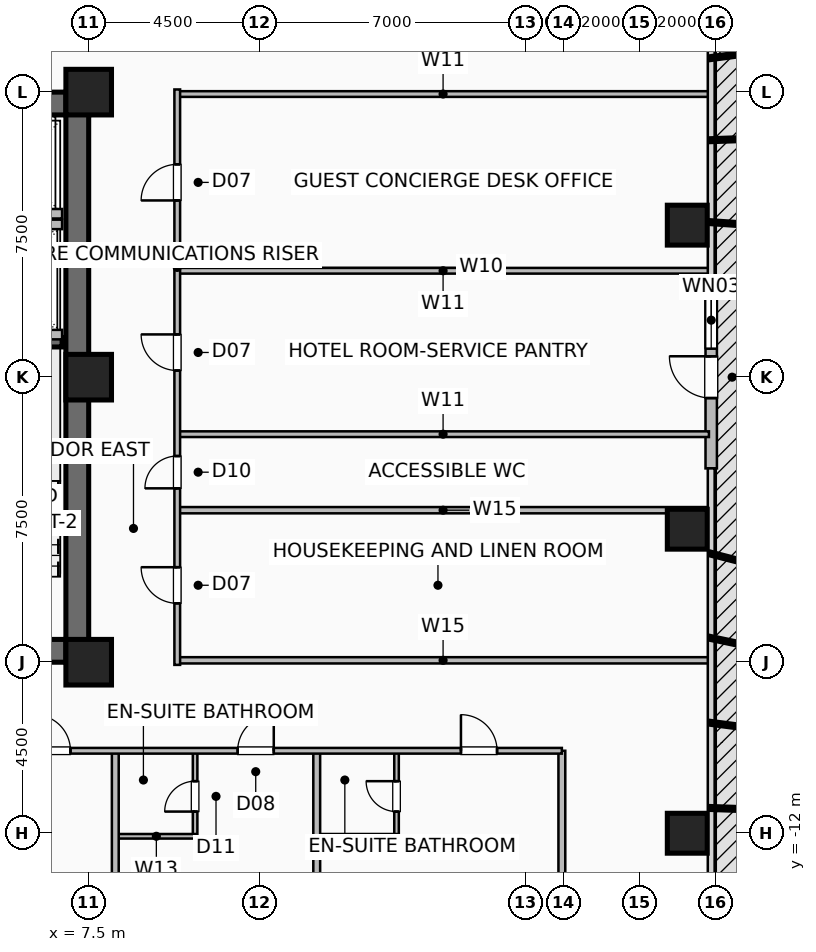
"""IFC4 building model, lengths in metres.
Left out: names, types, materials, properties, quantities, classifications, styles, units other than length and angle.
Written with IfcOpenShell. Run it as: python <this file> out.ifc"""

import sys

from ifc_helpers import new_model, si_unit, direction, frame, frame_2d, origin, origin_2d, place, context, subcontext, project, spatial, rectangle, hollow_rectangle, extrude, element, fill, save


model = new_model("IFC4")
c1 = context("Model", 3, precision=1e-05, world=origin(), true_north=direction((0.0, 1.0)))
c2 = subcontext(c1, "Body", "Model", "MODEL_VIEW")
j1 = project(units=[si_unit("LENGTHUNIT", "METRE"), si_unit("PLANEANGLEUNIT", "RADIAN")], contexts=[c1])
p1 = place(None, origin())
s1 = spatial("IfcSite", under=j1, at=p1, CompositionType="ELEMENT")
p2 = place(p1, origin())
s2 = spatial("IfcBuilding", under=s1, at=p2, CompositionType="ELEMENT")
p3 = place(p2, frame((0.0, 0.0, 27.0)))
s3 = spatial("IfcBuildingStorey", under=s2, at=p3, CompositionType="ELEMENT", Elevation=27.0)
for number, where, z_axis, x_axis in (
    (1, (7.5, -7.5, 0.0), (0.0, 0.0, 1.0), (1.0, 0.0, 0.0)),
    (2, (7.5, 0.0, 0.0), (0.0, 0.0, 1.0), (1.0, 0.0, 0.0)),
    (3, (7.5, 7.5, 0.0), (0.0, 0.0, 1.0), (1.0, 0.0, 0.0)),
):
    element("IfcColumn", number, at=place(p3, frame(where, z_axis=z_axis, x_axis=x_axis)), inside=s3, PredefinedType="COLUMN", context=c2, shape_type="SweptSolid", body=[
        extrude(hollow_rectangle(XDim=1.2, YDim=1.2, WallThickness=0.055, at=origin_2d()), origin(), (0.0, 0.0, 1.0), 3.5),
    ])
p4 = place(p3, frame((23.25, -12.0, -0.4), z_axis=(0.0, 0.0, 1.0), x_axis=(1.0, 0.0, 0.0)))
e4 = element("IfcColumn", 4, at=p4, inside=s3, PredefinedType="COLUMN", context=c2, shape_type="SweptSolid", body=[
    extrude(hollow_rectangle(XDim=1.05, YDim=1.05, WallThickness=0.05, at=origin_2d()), origin(), (0.0, 0.0, 1.0), 3.9),
])
for number, where, z_axis, x_axis in (
    (5, (23.25, -4.0, 0.0), (0.0, 0.0, 1.0), (1.0, 0.0, 0.0)),
    (6, (23.25, 4.0, 0.0), (0.0, 0.0, 1.0), (1.0, 0.0, 0.0)),
):
    element("IfcColumn", number, at=place(p3, frame(where, z_axis=z_axis, x_axis=x_axis)), inside=s3, PredefinedType="COLUMN", context=c2, shape_type="SweptSolid", body=[
        extrude(hollow_rectangle(XDim=1.05, YDim=1.05, WallThickness=0.05, at=origin_2d()), origin(), (0.0, 0.0, 1.0), 3.5),
    ])
p5 = place(p3, frame((23.88, -2.4, 0.0), z_axis=(0.0, 0.0, 1.0), x_axis=(0.0, 1.0, 0.0)))
e7 = element("IfcWall", 7, at=p5, inside=s3, PredefinedType="SOLIDWALL", context=c2, shape_type="SweptSolid", body=[
    extrude(rectangle(XDim=4.8, YDim=0.3, at=frame_2d((2.4, 0.0))), origin(), (0.0, 0.0, 1.0), 3.25),
])
p6 = place(p5, frame((1.85, 0.0, 0.0)))
e8 = element("IfcOpeningElement", 8, at=p6, cuts=e7, PredefinedType="OPENING", context=c2, shape_type="SweptSolid", body=[
    extrude(rectangle(XDim=1.1, YDim=2.2, at=frame_2d((0.55, 1.1))), frame((0.0, 0.16, 0.0), z_axis=(0.0, -1.0, 0.0), x_axis=(1.0, 0.0, 0.0)), (0.0, 0.0, 1.0), 0.32),
])
p7 = place(p5, frame((3.15, 0.0, 0.85)))
e9 = element("IfcOpeningElement", 9, at=p7, cuts=e7, PredefinedType="OPENING", context=c2, shape_type="SweptSolid", body=[
    extrude(rectangle(XDim=1.5, YDim=1.8, at=frame_2d((0.75, 0.9))), frame((0.0, 0.16, 0.0), z_axis=(0.0, -1.0, 0.0), x_axis=(1.0, 0.0, 0.0)), (0.0, 0.0, 1.0), 0.32),
])
p8 = place(p3, frame((-7.5, -7.2, 0.0), z_axis=(0.0, 0.0, 1.0), x_axis=(1.0, 0.0, 0.0)))
e10 = element("IfcWall", 10, at=p8, inside=s3, PredefinedType="SHEAR", context=c2, shape_type="SweptSolid", body=[
    extrude(rectangle(XDim=15.0, YDim=0.6, at=frame_2d((7.5, 0.0))), origin(), (0.0, 0.0, 1.0), 3.25),
])
p9 = place(p8, frame((1.55, 0.0, 0.0)))
e11 = element("IfcOpeningElement", 11, at=p9, cuts=e10, PredefinedType="OPENING", context=c2, shape_type="SweptSolid", body=[
    extrude(rectangle(XDim=1.05, YDim=2.08, at=frame_2d((0.525, 1.04))), frame((0.0, 0.31, 0.0), z_axis=(0.0, -1.0, 0.0), x_axis=(1.0, 0.0, 0.0)), (0.0, 0.0, 1.0), 0.62),
])
p10 = place(p8, frame((12.4, 0.0, 0.0)))
e12 = element("IfcOpeningElement", 12, at=p10, cuts=e10, PredefinedType="OPENING", context=c2, shape_type="SweptSolid", body=[
    extrude(rectangle(XDim=1.05, YDim=2.08, at=frame_2d((0.525, 1.04))), frame((0.0, 0.31, 0.0), z_axis=(0.0, -1.0, 0.0), x_axis=(1.0, 0.0, 0.0)), (0.0, 0.0, 1.0), 0.62),
])
p11 = place(p8, frame((4.64, 0.0, 0.0)))
e13 = element("IfcOpeningElement", 13, at=p11, cuts=e10, PredefinedType="OPENING", context=c2, shape_type="SweptSolid", body=[
    extrude(rectangle(XDim=1.1, YDim=2.2, at=frame_2d((0.55, 1.1))), frame((0.0, 0.31, 0.0), z_axis=(0.0, -1.0, 0.0), x_axis=(1.0, 0.0, 0.0)), (0.0, 0.0, 1.0), 0.62),
])
p12 = place(p8, frame((6.52, 0.0, 0.0)))
e14 = element("IfcOpeningElement", 14, at=p12, cuts=e10, PredefinedType="OPENING", context=c2, shape_type="SweptSolid", body=[
    extrude(rectangle(XDim=1.1, YDim=2.2, at=frame_2d((0.55, 1.1))), frame((0.0, 0.31, 0.0), z_axis=(0.0, -1.0, 0.0), x_axis=(1.0, 0.0, 0.0)), (0.0, 0.0, 1.0), 0.62),
])
p13 = place(p8, frame((8.4, 0.0, 0.0)))
e15 = element("IfcOpeningElement", 15, at=p13, cuts=e10, PredefinedType="OPENING", context=c2, shape_type="SweptSolid", body=[
    extrude(rectangle(XDim=1.1, YDim=2.2, at=frame_2d((0.55, 1.1))), frame((0.0, 0.31, 0.0), z_axis=(0.0, -1.0, 0.0), x_axis=(1.0, 0.0, 0.0)), (0.0, 0.0, 1.0), 0.62),
])
for number, where, z_axis, x_axis in (
    (16, (-7.5, 7.2, 0.0), (0.0, 0.0, 1.0), (1.0, 0.0, 0.0)),
    (17, (7.2, -7.5, 0.0), (0.0, 0.0, 1.0), (0.0, 1.0, 0.0)),
):
    element("IfcWall", number, at=place(p3, frame(where, z_axis=z_axis, x_axis=x_axis)), inside=s3, PredefinedType="SHEAR", context=c2, shape_type="SweptSolid", body=[
        extrude(rectangle(XDim=15.0, YDim=0.6, at=frame_2d((7.5, 0.0))), origin(), (0.0, 0.0, 1.0), 3.25),
    ])
p14 = place(p3, frame((3.47, 0.92, 0.0), z_axis=(0.0, 0.0, 1.0), x_axis=(1.0, 0.0, 0.0)))
e18 = element("IfcWall", 18, at=p14, inside=s3, PredefinedType="SHEAR", context=c2, shape_type="SweptSolid", body=[
    extrude(rectangle(XDim=3.33, YDim=0.25, at=frame_2d((1.665, 0.0))), origin(), (0.0, 0.0, 1.0), 3.25),
])
p15 = place(p3, frame((4.38, 4.3, 0.0), z_axis=(0.0, 0.0, 1.0), x_axis=(1.0, 0.0, 0.0)))
e19 = element("IfcWall", 19, at=p15, inside=s3, PredefinedType="SHEAR", context=c2, shape_type="SweptSolid", body=[
    extrude(rectangle(XDim=2.42, YDim=0.25, at=frame_2d((1.21, 0.0))), origin(), (0.0, 0.0, 1.0), 3.25),
])
for number, where, z_axis, x_axis in (
    (20, (4.28, 1.12, 0.0), (0.0, 0.0, 1.0), (1.0, 0.0, 0.0)),
    (21, (4.28, 4.02, 0.0), (0.0, 0.0, 1.0), (1.0, 0.0, 0.0)),
):
    element("IfcWall", number, at=place(p3, frame(where, z_axis=z_axis, x_axis=x_axis)), inside=s3, PredefinedType="SHEAR", context=c2, shape_type="SweptSolid", body=[
        extrude(rectangle(XDim=2.52, YDim=0.25, at=frame_2d((1.26, 0.0))), origin(), (0.0, 0.0, 1.0), 3.25),
    ])
p16 = place(p3, frame((10.3, -12.08, 0.0), z_axis=(0.0, 0.0, 1.0), x_axis=(0.0, 1.0, 0.0)))
e22 = element("IfcWall", 22, at=p16, inside=s3, PredefinedType="PLUMBINGWALL", context=c2, shape_type="SweptSolid", body=[
    extrude(rectangle(XDim=2.25, YDim=0.12, at=frame_2d((1.125, 0.0))), origin(), (0.0, 0.0, 1.0), 3.25),
])
p17 = place(p16, frame((0.65, 0.0, 0.0)))
e23 = element("IfcOpeningElement", 23, at=p17, cuts=e22, PredefinedType="OPENING", context=c2, shape_type="SweptSolid", body=[
    extrude(rectangle(XDim=0.8, YDim=2.05, at=frame_2d((0.4, 1.025))), frame((0.0, 0.07, 0.0), z_axis=(0.0, -1.0, 0.0), x_axis=(1.0, 0.0, 0.0)), (0.0, 0.0, 1.0), 0.14),
])
p18 = place(p3, frame((8.23, -12.08, 0.0), z_axis=(0.0, 0.0, 1.0), x_axis=(1.0, 0.0, 0.0)))
e24 = element("IfcWall", 24, at=p18, inside=s3, PredefinedType="PLUMBINGWALL", context=c2, shape_type="SweptSolid", body=[
    extrude(rectangle(XDim=2.1, YDim=0.12, at=frame_2d((1.05, 0.0))), origin(), (0.0, 0.0, 1.0), 3.25),
])
p19 = place(p3, frame((15.6, -12.08, 0.0), z_axis=(0.0, 0.0, 1.0), x_axis=(0.0, 1.0, 0.0)))
e25 = element("IfcWall", 25, at=p19, inside=s3, PredefinedType="PLUMBINGWALL", context=c2, shape_type="SweptSolid", body=[
    extrude(rectangle(XDim=2.25, YDim=0.12, at=frame_2d((1.125, 0.0))), origin(), (0.0, 0.0, 1.0), 3.25),
])
p20 = place(p19, frame((0.65, 0.0, 0.0)))
e26 = element("IfcOpeningElement", 26, at=p20, cuts=e25, PredefinedType="OPENING", context=c2, shape_type="SweptSolid", body=[
    extrude(rectangle(XDim=0.8, YDim=2.05, at=frame_2d((0.4, 1.025))), frame((0.0, 0.07, 0.0), z_axis=(0.0, -1.0, 0.0), x_axis=(1.0, 0.0, 0.0)), (0.0, 0.0, 1.0), 0.14),
])
p21 = place(p3, frame((13.53, -12.08, 0.0), z_axis=(0.0, 0.0, 1.0), x_axis=(1.0, 0.0, 0.0)))
e27 = element("IfcWall", 27, at=p21, inside=s3, PredefinedType="PLUMBINGWALL", context=c2, shape_type="SweptSolid", body=[
    extrude(rectangle(XDim=2.1, YDim=0.12, at=frame_2d((1.05, 0.0))), origin(), (0.0, 0.0, 1.0), 3.25),
])
for number, where, z_axis, x_axis in (
    (28, (8.2, -23.82, 0.0), (0.0, 0.0, 1.0), (0.0, 1.0, 0.0)),
    (29, (13.5, -23.82, 0.0), (0.0, 0.0, 1.0), (0.0, 1.0, 0.0)),
    (30, (19.95, -23.82, 0.0), (0.0, 0.0, 1.0), (0.0, 1.0, 0.0)),
):
    element("IfcWall", number, at=place(p3, frame(where, z_axis=z_axis, x_axis=x_axis)), inside=s3, PredefinedType="PARTITIONING", context=c2, shape_type="SweptSolid", body=[
        extrude(rectangle(XDim=13.99, YDim=0.18, at=frame_2d((6.995, 0.0))), origin(), (0.0, 0.0, 1.0), 3.25),
    ])
p22 = place(p3, frame((-19.95, -9.83, 0.0), z_axis=(0.0, 0.0, 1.0), x_axis=(1.0, 0.0, 0.0)))
e31 = element("IfcWall", 31, at=p22, inside=s3, PredefinedType="PARTITIONING", context=c2, shape_type="SweptSolid", body=[
    extrude(rectangle(XDim=39.9, YDim=0.15, at=frame_2d((19.95, 0.0))), origin(), (0.0, 0.0, 1.0), 3.25),
])
p23 = place(p22, frame((3.945, 0.0, 0.0)))
e32 = element("IfcOpeningElement", 32, at=p23, cuts=e31, PredefinedType="OPENING", context=c2, shape_type="SweptSolid", body=[
    extrude(rectangle(XDim=0.95, YDim=2.08, at=frame_2d((0.475, 1.04))), frame((0.0, 0.085, 0.0), z_axis=(0.0, -1.0, 0.0), x_axis=(1.0, 0.0, 0.0)), (0.0, 0.0, 1.0), 0.17),
])
p24 = place(p22, frame((10.02, 0.0, 0.0)))
e33 = element("IfcOpeningElement", 33, at=p24, cuts=e31, PredefinedType="OPENING", context=c2, shape_type="SweptSolid", body=[
    extrude(rectangle(XDim=0.95, YDim=2.08, at=frame_2d((0.475, 1.04))), frame((0.0, 0.085, 0.0), z_axis=(0.0, -1.0, 0.0), x_axis=(1.0, 0.0, 0.0)), (0.0, 0.0, 1.0), 0.17),
])
p25 = place(p22, frame((15.42, 0.0, 0.0)))
e34 = element("IfcOpeningElement", 34, at=p25, cuts=e31, PredefinedType="OPENING", context=c2, shape_type="SweptSolid", body=[
    extrude(rectangle(XDim=0.95, YDim=2.08, at=frame_2d((0.475, 1.04))), frame((0.0, 0.085, 0.0), z_axis=(0.0, -1.0, 0.0), x_axis=(1.0, 0.0, 0.0)), (0.0, 0.0, 1.0), 0.17),
])
p26 = place(p22, frame((20.702, 0.0, 0.0)))
e35 = element("IfcOpeningElement", 35, at=p26, cuts=e31, PredefinedType="OPENING", context=c2, shape_type="SweptSolid", body=[
    extrude(rectangle(XDim=0.95, YDim=2.08, at=frame_2d((0.475, 1.04))), frame((0.0, 0.085, 0.0), z_axis=(0.0, -1.0, 0.0), x_axis=(1.0, 0.0, 0.0)), (0.0, 0.0, 1.0), 0.17),
])
p27 = place(p22, frame((26.02, 0.0, 0.0)))
e36 = element("IfcOpeningElement", 36, at=p27, cuts=e31, PredefinedType="OPENING", context=c2, shape_type="SweptSolid", body=[
    extrude(rectangle(XDim=0.95, YDim=2.08, at=frame_2d((0.475, 1.04))), frame((0.0, 0.085, 0.0), z_axis=(0.0, -1.0, 0.0), x_axis=(1.0, 0.0, 0.0)), (0.0, 0.0, 1.0), 0.17),
])
p28 = place(p22, frame((31.37, 0.0, 0.0)))
e37 = element("IfcOpeningElement", 37, at=p28, cuts=e31, PredefinedType="OPENING", context=c2, shape_type="SweptSolid", body=[
    extrude(rectangle(XDim=0.95, YDim=2.08, at=frame_2d((0.475, 1.04))), frame((0.0, 0.085, 0.0), z_axis=(0.0, -1.0, 0.0), x_axis=(1.0, 0.0, 0.0)), (0.0, 0.0, 1.0), 0.17),
])
p29 = place(p22, frame((37.245, 0.0, 0.0)))
e38 = element("IfcOpeningElement", 38, at=p29, cuts=e31, PredefinedType="OPENING", context=c2, shape_type="SweptSolid", body=[
    extrude(rectangle(XDim=0.95, YDim=2.08, at=frame_2d((0.475, 1.04))), frame((0.0, 0.085, 0.0), z_axis=(0.0, -1.0, 0.0), x_axis=(1.0, 0.0, 0.0)), (0.0, 0.0, 1.0), 0.17),
])
for number, where, z_axis, x_axis in (
    (39, (9.83, -7.45, 0.0), (0.0, 0.0, 1.0), (1.0, 0.0, 0.0)),
    (40, (9.83, -3.5, 0.0), (0.0, 0.0, 1.0), (1.0, 0.0, 0.0)),
):
    element("IfcWall", number, at=place(p3, frame(where, z_axis=z_axis, x_axis=x_axis)), inside=s3, PredefinedType="PLUMBINGWALL", context=c2, shape_type="SweptSolid", body=[
        extrude(rectangle(XDim=13.99, YDim=0.165, at=frame_2d((6.995, 0.0))), origin(), (0.0, 0.0, 1.0), 3.25),
    ])
for number, where, z_axis, x_axis in (
    (41, (9.83, -1.5, 0.0), (0.0, 0.0, 1.0), (1.0, 0.0, 0.0)),
    (42, (9.83, 2.8, 0.0), (0.0, 0.0, 1.0), (1.0, 0.0, 0.0)),
    (43, (9.83, 7.45, 0.0), (0.0, 0.0, 1.0), (1.0, 0.0, 0.0)),
):
    element("IfcWall", number, at=place(p3, frame(where, z_axis=z_axis, x_axis=x_axis)), inside=s3, PredefinedType="PARTITIONING", context=c2, shape_type="SweptSolid", body=[
        extrude(rectangle(XDim=13.99, YDim=0.15, at=frame_2d((6.995, 0.0))), origin(), (0.0, 0.0, 1.0), 3.25),
    ])
p30 = place(p3, frame((9.83, -7.57, 0.0), z_axis=(0.0, 0.0, 1.0), x_axis=(0.0, 1.0, 0.0)))
e44 = element("IfcWall", 44, at=p30, inside=s3, PredefinedType="PARTITIONING", context=c2, shape_type="SweptSolid", body=[
    extrude(rectangle(XDim=15.14, YDim=0.15, at=frame_2d((7.57, 0.0))), origin(), (0.0, 0.0, 1.0), 3.25),
])
p31 = place(p30, frame((1.62, 0.0, 0.0)))
e45 = element("IfcOpeningElement", 45, at=p31, cuts=e44, PredefinedType="OPENING", context=c2, shape_type="SweptSolid", body=[
    extrude(rectangle(XDim=0.95, YDim=2.06, at=frame_2d((0.475, 1.03))), frame((0.0, 0.085, 0.0), z_axis=(0.0, -1.0, 0.0), x_axis=(1.0, 0.0, 0.0)), (0.0, 0.0, 1.0), 0.17),
])
p32 = place(p30, frame((4.645, 0.0, 0.0)))
e46 = element("IfcOpeningElement", 46, at=p32, cuts=e44, PredefinedType="OPENING", context=c2, shape_type="SweptSolid", body=[
    extrude(rectangle(XDim=0.85, YDim=2.05, at=frame_2d((0.425, 1.025))), frame((0.0, 0.085, 0.0), z_axis=(0.0, -1.0, 0.0), x_axis=(1.0, 0.0, 0.0)), (0.0, 0.0, 1.0), 0.17),
])
p33 = place(p30, frame((7.745, 0.0, 0.0)))
e47 = element("IfcOpeningElement", 47, at=p33, cuts=e44, PredefinedType="OPENING", context=c2, shape_type="SweptSolid", body=[
    extrude(rectangle(XDim=0.95, YDim=2.06, at=frame_2d((0.475, 1.03))), frame((0.0, 0.085, 0.0), z_axis=(0.0, -1.0, 0.0), x_axis=(1.0, 0.0, 0.0)), (0.0, 0.0, 1.0), 0.17),
])
p34 = place(p30, frame((12.22, 0.0, 0.0)))
e48 = element("IfcOpeningElement", 48, at=p34, cuts=e44, PredefinedType="OPENING", context=c2, shape_type="SweptSolid", body=[
    extrude(rectangle(XDim=0.95, YDim=2.06, at=frame_2d((0.475, 1.03))), frame((0.0, 0.085, 0.0), z_axis=(0.0, -1.0, 0.0), x_axis=(1.0, 0.0, 0.0)), (0.0, 0.0, 1.0), 0.17),
])
p35 = place(p6, origin())
e49 = element("IfcDoor", 49, at=p35, inside=s3, OperationType="SINGLE_SWING_RIGHT", PredefinedType="DOOR", context=c2, shape_type="SweptSolid", body=[
    extrude(rectangle(XDim=1.1, YDim=2.2, at=frame_2d((0.55, 1.1))), frame((0.0, 0.025, 0.0), z_axis=(0.0, -1.0, 0.0), x_axis=(1.0, 0.0, 0.0)), (0.0, 0.0, 1.0), 0.05),
])
fill(e8, e49)
p36 = place(p7, origin())
e50 = element("IfcWindow", 50, at=p36, inside=s3, PartitioningType="SINGLE_PANEL", PredefinedType="WINDOW", context=c2, shape_type="SweptSolid", body=[
    extrude(rectangle(XDim=1.5, YDim=1.8, at=frame_2d((0.75, 0.9))), frame((0.0, 0.03, 0.0), z_axis=(0.0, -1.0, 0.0), x_axis=(1.0, 0.0, 0.0)), (0.0, 0.0, 1.0), 0.06),
])
fill(e9, e50)
p37 = place(p17, origin())
e51 = element("IfcDoor", 51, at=p37, inside=s3, OperationType="SINGLE_SWING_LEFT", PredefinedType="DOOR", context=c2, shape_type="SweptSolid", body=[
    extrude(rectangle(XDim=0.8, YDim=2.05, at=frame_2d((0.4, 1.025))), frame((0.0, 0.025, 0.0), z_axis=(0.0, -1.0, 0.0), x_axis=(1.0, 0.0, 0.0)), (0.0, 0.0, 1.0), 0.05),
])
fill(e23, e51)
p38 = place(p20, origin())
e52 = element("IfcDoor", 52, at=p38, inside=s3, OperationType="SINGLE_SWING_RIGHT", PredefinedType="DOOR", context=c2, shape_type="SweptSolid", body=[
    extrude(rectangle(XDim=0.8, YDim=2.05, at=frame_2d((0.4, 1.025))), frame((0.0, 0.025, 0.0), z_axis=(0.0, -1.0, 0.0), x_axis=(1.0, 0.0, 0.0)), (0.0, 0.0, 1.0), 0.05),
])
fill(e26, e52)
p39 = place(p27, origin())
e53 = element("IfcDoor", 53, at=p39, inside=s3, OperationType="SINGLE_SWING_LEFT", PredefinedType="DOOR", context=c2, shape_type="SweptSolid", body=[
    extrude(rectangle(XDim=0.95, YDim=2.08, at=frame_2d((0.475, 1.04))), frame((0.0, 0.025, 0.0), z_axis=(0.0, -1.0, 0.0), x_axis=(1.0, 0.0, 0.0)), (0.0, 0.0, 1.0), 0.05),
])
fill(e36, e53)
p40 = place(p28, origin())
e54 = element("IfcDoor", 54, at=p40, inside=s3, OperationType="SINGLE_SWING_RIGHT", PredefinedType="DOOR", context=c2, shape_type="SweptSolid", body=[
    extrude(rectangle(XDim=0.95, YDim=2.08, at=frame_2d((0.475, 1.04))), frame((0.0, 0.025, 0.0), z_axis=(0.0, -1.0, 0.0), x_axis=(1.0, 0.0, 0.0)), (0.0, 0.0, 1.0), 0.05),
])
fill(e37, e54)
p41 = place(p29, origin())
e55 = element("IfcDoor", 55, at=p41, inside=s3, OperationType="SINGLE_SWING_LEFT", PredefinedType="DOOR", context=c2, shape_type="SweptSolid", body=[
    extrude(rectangle(XDim=0.95, YDim=2.08, at=frame_2d((0.475, 1.04))), frame((0.0, 0.025, 0.0), z_axis=(0.0, -1.0, 0.0), x_axis=(1.0, 0.0, 0.0)), (0.0, 0.0, 1.0), 0.05),
])
fill(e38, e55)
p42 = place(p31, origin())
e56 = element("IfcDoor", 56, at=p42, inside=s3, OperationType="SINGLE_SWING_RIGHT", PredefinedType="DOOR", context=c2, shape_type="SweptSolid", body=[
    extrude(rectangle(XDim=0.95, YDim=2.06, at=frame_2d((0.475, 1.03))), frame((0.0, 0.025, 0.0), z_axis=(0.0, -1.0, 0.0), x_axis=(1.0, 0.0, 0.0)), (0.0, 0.0, 1.0), 0.05),
])
fill(e45, e56)
p43 = place(p32, origin())
e57 = element("IfcDoor", 57, at=p43, inside=s3, OperationType="SINGLE_SWING_LEFT", PredefinedType="DOOR", context=c2, shape_type="SweptSolid", body=[
    extrude(rectangle(XDim=0.85, YDim=2.05, at=frame_2d((0.425, 1.025))), frame((0.0, 0.025, 0.0), z_axis=(0.0, -1.0, 0.0), x_axis=(1.0, 0.0, 0.0)), (0.0, 0.0, 1.0), 0.05),
])
fill(e46, e57)
p44 = place(p33, origin())
e58 = element("IfcDoor", 58, at=p44, inside=s3, OperationType="SINGLE_SWING_RIGHT", PredefinedType="DOOR", context=c2, shape_type="SweptSolid", body=[
    extrude(rectangle(XDim=0.95, YDim=2.06, at=frame_2d((0.475, 1.03))), frame((0.0, 0.025, 0.0), z_axis=(0.0, -1.0, 0.0), x_axis=(1.0, 0.0, 0.0)), (0.0, 0.0, 1.0), 0.05),
])
fill(e47, e58)
p45 = place(p34, origin())
e59 = element("IfcDoor", 59, at=p45, inside=s3, OperationType="SINGLE_SWING_LEFT", PredefinedType="DOOR", context=c2, shape_type="SweptSolid", body=[
    extrude(rectangle(XDim=0.95, YDim=2.06, at=frame_2d((0.475, 1.03))), frame((0.0, 0.025, 0.0), z_axis=(0.0, -1.0, 0.0), x_axis=(1.0, 0.0, 0.0)), (0.0, 0.0, 1.0), 0.05),
])
fill(e48, e59)
save(model, sys.argv[1])
